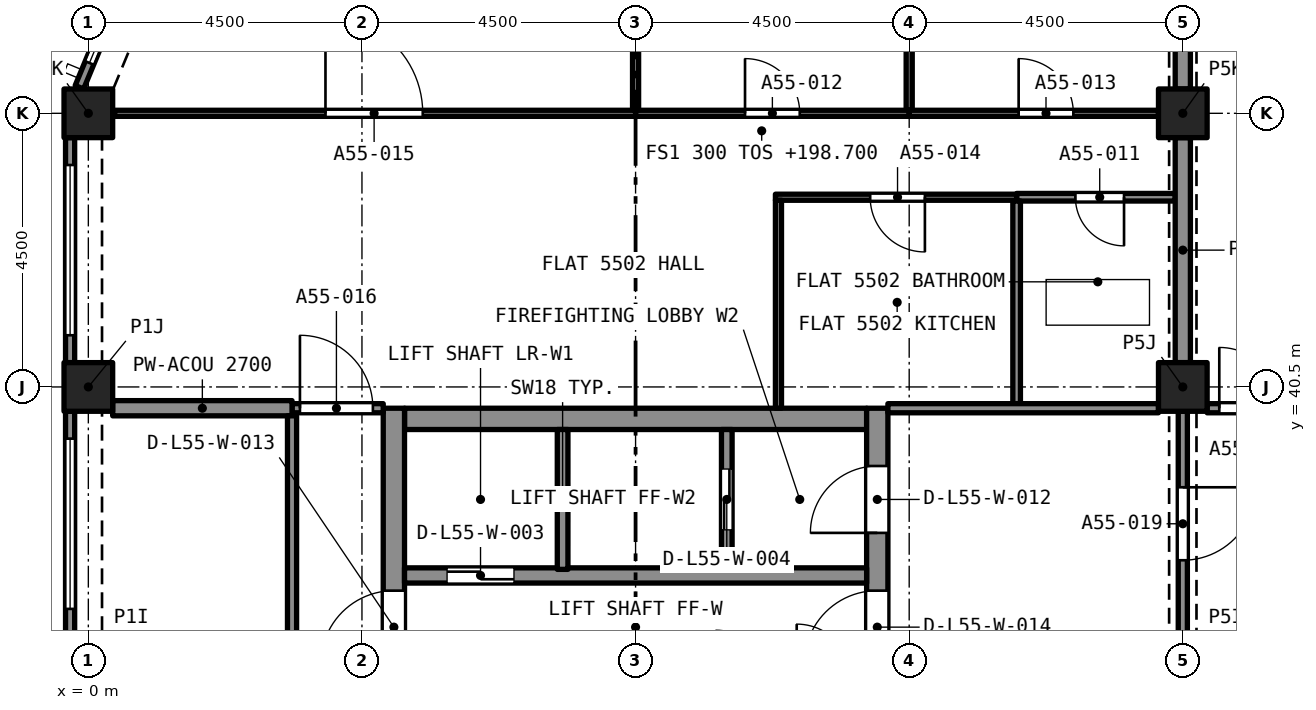
"""IFC4 building model, lengths in metres.
Left out: names, types, materials, properties, quantities, classifications, styles, units other than length and angle.
Written with IfcOpenShell. Run it as: python <this file> out.ifc"""

import sys

from ifc_helpers import new_model, si_unit, direction, frame, frame_2d, origin, origin_2d, place, context, subcontext, project, spatial, rectangle, extrude, element, fill, save


model = new_model("IFC4")
c1 = context("Model", 3, precision=1e-05, world=origin(), true_north=direction((0.0, 1.0)))
c2 = subcontext(c1, "Body", "Model", "MODEL_VIEW")
j1 = project(units=[si_unit("LENGTHUNIT", "METRE"), si_unit("PLANEANGLEUNIT", "RADIAN")], contexts=[c1])
p1 = place(None, origin())
s1 = spatial("IfcSite", under=j1, at=p1, CompositionType="ELEMENT")
p2 = place(p1, origin())
s2 = spatial("IfcBuilding", under=s1, at=p2, CompositionType="ELEMENT")
p3 = place(p2, frame((0.0, 0.0, 198.7)))
s3 = spatial("IfcBuildingStorey", under=s2, at=p3, CompositionType="ELEMENT", Elevation=198.7)
for number, where, z_axis, x_axis in (
    (1, (0.0, 40.5, 0.0), (0.0, 0.0, 1.0), (1.0, 0.0, 0.0)),
    (2, (18.0, 40.5, 0.0), (0.0, 0.0, 1.0), (1.0, 0.0, 0.0)),
    (3, (0.0, 45.0, 0.0), (0.0, 0.0, 1.0), (1.0, 0.0, 0.0)),
    (4, (18.0, 45.0, 0.0), (0.0, 0.0, 1.0), (1.0, 0.0, 0.0)),
):
    element("IfcColumn", number, at=place(p3, frame(where, z_axis=z_axis, x_axis=x_axis)), inside=s3, PredefinedType="COLUMN", context=c2, shape_type="SweptSolid", body=[
        extrude(rectangle(XDim=0.8, YDim=0.8, at=origin_2d()), origin(), (0.0, 0.0, 1.0), 3.2),
    ])
p4 = place(p3, frame((5.2, 39.975, 0.0), z_axis=(0.0, 0.0, 1.0), x_axis=(1.0, 0.0, 0.0)))
e5 = element("IfcWall", 5, at=p4, inside=s3, PredefinedType="SOLIDWALL", context=c2, shape_type="SweptSolid", body=[
    extrude(rectangle(XDim=7.6, YDim=0.35, at=frame_2d((3.8, 0.0))), origin(), (0.0, 0.0, 1.0), 3.2),
])
p5 = place(p3, frame((5.025, 27.35, 0.0), z_axis=(0.0, 0.0, 1.0), x_axis=(0.0, 1.0, 0.0)))
e6 = element("IfcWall", 6, at=p5, inside=s3, PredefinedType="SOLIDWALL", context=c2, shape_type="SweptSolid", body=[
    extrude(rectangle(XDim=12.8, YDim=0.35, at=frame_2d((6.4, 0.0))), origin(), (0.0, 0.0, 1.0), 3.2),
])
p6 = place(p5, frame((8.6, 0.0, 0.0)))
e7 = element("IfcOpeningElement", 7, at=p6, cuts=e6, PredefinedType="OPENING", context=c2, shape_type="SweptSolid", body=[
    extrude(rectangle(XDim=1.2, YDim=2.1, at=frame_2d((0.6, 1.05))), frame((0.0, 0.185, 0.0), z_axis=(0.0, -1.0, 0.0), x_axis=(1.0, 0.0, 0.0)), (0.0, 0.0, 1.0), 0.37),
])
p7 = place(p3, frame((12.975, 27.35, 0.0), z_axis=(0.0, 0.0, 1.0), x_axis=(0.0, 1.0, 0.0)))
e8 = element("IfcWall", 8, at=p7, inside=s3, PredefinedType="SOLIDWALL", context=c2, shape_type="SweptSolid", body=[
    extrude(rectangle(XDim=12.8, YDim=0.35, at=frame_2d((6.4, 0.0))), origin(), (0.0, 0.0, 1.0), 3.2),
])
p8 = place(p7, frame((10.75, 0.0, 0.0)))
e9 = element("IfcOpeningElement", 9, at=p8, cuts=e8, PredefinedType="OPENING", context=c2, shape_type="SweptSolid", body=[
    extrude(rectangle(XDim=1.1, YDim=2.1, at=frame_2d((0.55, 1.05))), frame((0.0, 0.185, 0.0), z_axis=(0.0, -1.0, 0.0), x_axis=(1.0, 0.0, 0.0)), (0.0, 0.0, 1.0), 0.37),
])
p9 = place(p7, frame((8.6, 0.0, 0.0)))
e10 = element("IfcOpeningElement", 10, at=p9, cuts=e8, PredefinedType="OPENING", context=c2, shape_type="SweptSolid", body=[
    extrude(rectangle(XDim=1.2, YDim=2.1, at=frame_2d((0.6, 1.05))), frame((0.0, 0.185, 0.0), z_axis=(0.0, -1.0, 0.0), x_axis=(1.0, 0.0, 0.0)), (0.0, 0.0, 1.0), 0.37),
])
p10 = place(p3, frame((-0.147, 45.429, 0.0), z_axis=(0.0, 0.0, 1.0), x_axis=(0.382669406082, 0.923885342263, 0.0)))
e11 = element("IfcWall", 11, at=p10, inside=s3, PredefinedType="SOLIDWALL", context=c2, shape_type="SweptSolid", body=[
    extrude(rectangle(XDim=2.602, YDim=0.15, at=frame_2d((1.301, 0.0))), origin(), (0.0, 0.0, 1.0), 3.2),
])
p11 = place(p10, frame((0.432, 0.0, 0.45)))
e12 = element("IfcOpeningElement", 12, at=p11, cuts=e11, PredefinedType="OPENING", context=c2, shape_type="SweptSolid", body=[
    extrude(rectangle(XDim=1.9, YDim=1.95, at=frame_2d((0.95, 0.975))), frame((0.0, 0.085, 0.0), z_axis=(0.0, -1.0, 0.0), x_axis=(1.0, 0.0, 0.0)), (0.0, 0.0, 1.0), 0.17),
])
p12 = place(p3, frame((-0.3, 40.9, 0.0), z_axis=(0.0, 0.0, 1.0), x_axis=(0.0, 1.0, 0.0)))
e13 = element("IfcWall", 13, at=p12, inside=s3, PredefinedType="SOLIDWALL", context=c2, shape_type="SweptSolid", body=[
    extrude(rectangle(XDim=3.7, YDim=0.15, at=frame_2d((1.85, 0.0))), origin(), (0.0, 0.0, 1.0), 3.2),
])
p13 = place(p12, frame((0.45, 0.0, 0.45)))
e14 = element("IfcOpeningElement", 14, at=p13, cuts=e13, PredefinedType="OPENING", context=c2, shape_type="SweptSolid", body=[
    extrude(rectangle(XDim=2.8, YDim=1.95, at=frame_2d((1.4, 0.975))), frame((0.0, 0.085, 0.0), z_axis=(0.0, -1.0, 0.0), x_axis=(1.0, 0.0, 0.0)), (0.0, 0.0, 1.0), 0.17),
])
p14 = place(p3, frame((-0.3, 36.4, 0.0), z_axis=(0.0, 0.0, 1.0), x_axis=(0.0, 1.0, 0.0)))
e15 = element("IfcWall", 15, at=p14, inside=s3, PredefinedType="SOLIDWALL", context=c2, shape_type="SweptSolid", body=[
    extrude(rectangle(XDim=3.7, YDim=0.15, at=frame_2d((1.85, 0.0))), origin(), (0.0, 0.0, 1.0), 3.2),
])
p15 = place(p14, frame((0.45, 0.0, 0.45)))
e16 = element("IfcOpeningElement", 16, at=p15, cuts=e15, PredefinedType="OPENING", context=c2, shape_type="SweptSolid", body=[
    extrude(rectangle(XDim=2.8, YDim=1.95, at=frame_2d((1.4, 0.975))), frame((0.0, 0.085, 0.0), z_axis=(0.0, -1.0, 0.0), x_axis=(1.0, 0.0, 0.0)), (0.0, 0.0, 1.0), 0.17),
])
p16 = place(p3, frame((17.875, 43.62, 0.0), z_axis=(0.0, 0.0, 1.0), x_axis=(-1.0, 0.0, 0.0)))
e17 = element("IfcWall", 17, at=p16, inside=s3, PredefinedType="PARTITIONING", context=c2, shape_type="SweptSolid", body=[
    extrude(rectangle(XDim=2.608, YDim=0.125, at=frame_2d((1.304, 0.0))), origin(), (0.0, 0.0, 1.0), 2.7),
])
p17 = place(p16, frame((0.842, 0.0, 0.0)))
e18 = element("IfcOpeningElement", 18, at=p17, cuts=e17, PredefinedType="OPENING", context=c2, shape_type="SweptSolid", body=[
    extrude(rectangle(XDim=0.8, YDim=2.1, at=frame_2d((0.4, 1.05))), frame((0.0, 0.073, 0.0), z_axis=(0.0, -1.0, 0.0), x_axis=(1.0, 0.0, 0.0)), (0.0, 0.0, 1.0), 0.145),
])
p18 = place(p3, frame((15.267, 40.225, 0.0), z_axis=(0.0, 0.0, 1.0), x_axis=(0.0, 1.0, 0.0)))
e19 = element("IfcWall", 19, at=p18, inside=s3, PredefinedType="PARTITIONING", context=c2, shape_type="SweptSolid", body=[
    extrude(rectangle(XDim=3.333, YDim=0.125, at=frame_2d((1.666, 0.0))), origin(), (0.0, 0.0, 1.0), 2.7),
])
p19 = place(p3, frame((18.0, 40.9, 0.0), z_axis=(0.0, 0.0, 1.0), x_axis=(0.0, 1.0, 0.0)))
e20 = element("IfcWall", 20, at=p19, inside=s3, PredefinedType="PARTITIONING", context=c2, shape_type="SweptSolid", body=[
    extrude(rectangle(XDim=3.7, YDim=0.25, at=frame_2d((1.85, 0.0))), origin(), (0.0, 0.0, 1.0), 2.38),
])
p20 = place(p3, frame((13.5, 45.05, 0.0), z_axis=(0.0, 0.0, 1.0), x_axis=(0.0, 1.0, 0.0)))
e21 = element("IfcWall", 21, at=p20, inside=s3, PredefinedType="PARTITIONING", context=c2, shape_type="SweptSolid", body=[
    extrude(rectangle(XDim=4.05, YDim=0.1, at=frame_2d((2.025, 0.0))), origin(), (0.0, 0.0, 1.0), 2.7),
])
p21 = place(p3, frame((9.0, 45.0, 0.0), z_axis=(0.0, 0.0, 1.0), x_axis=(1.0, 0.0, 0.0)))
e22 = element("IfcWall", 22, at=p21, inside=s3, PredefinedType="PARTITIONING", context=c2, shape_type="SweptSolid", body=[
    extrude(rectangle(XDim=4.5, YDim=0.1, at=frame_2d((2.25, 0.0))), origin(), (0.0, 0.0, 1.0), 2.7),
])
p22 = place(p21, frame((1.8, 0.0, 0.0)))
e23 = element("IfcOpeningElement", 23, at=p22, cuts=e22, PredefinedType="OPENING", context=c2, shape_type="SweptSolid", body=[
    extrude(rectangle(XDim=0.9, YDim=2.1, at=frame_2d((0.45, 1.05))), frame((0.0, 0.06, 0.0), z_axis=(0.0, -1.0, 0.0), x_axis=(1.0, 0.0, 0.0)), (0.0, 0.0, 1.0), 0.12),
])
p23 = place(p3, frame((9.0, 45.05, 0.0), z_axis=(0.0, 0.0, 1.0), x_axis=(0.0, 1.0, 0.0)))
e24 = element("IfcWall", 24, at=p23, inside=s3, PredefinedType="PARTITIONING", context=c2, shape_type="SweptSolid", body=[
    extrude(rectangle(XDim=4.05, YDim=0.1, at=frame_2d((2.025, 0.0))), origin(), (0.0, 0.0, 1.0), 2.7),
])
p24 = place(p3, frame((13.5, 45.0, 0.0), z_axis=(0.0, 0.0, 1.0), x_axis=(1.0, 0.0, 0.0)))
e25 = element("IfcWall", 25, at=p24, inside=s3, PredefinedType="PARTITIONING", context=c2, shape_type="SweptSolid", body=[
    extrude(rectangle(XDim=4.1, YDim=0.1, at=frame_2d((2.05, 0.0))), origin(), (0.0, 0.0, 1.0), 2.7),
])
p25 = place(p24, frame((1.8, 0.0, 0.0)))
e26 = element("IfcOpeningElement", 26, at=p25, cuts=e25, PredefinedType="OPENING", context=c2, shape_type="SweptSolid", body=[
    extrude(rectangle(XDim=0.9, YDim=2.1, at=frame_2d((0.45, 1.05))), frame((0.0, 0.06, 0.0), z_axis=(0.0, -1.0, 0.0), x_axis=(1.0, 0.0, 0.0)), (0.0, 0.0, 1.0), 0.12),
])
p26 = place(p3, frame((18.0, 45.4, 0.0), z_axis=(0.0, 0.0, 1.0), x_axis=(0.0, 1.0, 0.0)))
e27 = element("IfcWall", 27, at=p26, inside=s3, PredefinedType="PARTITIONING", context=c2, shape_type="SweptSolid", body=[
    extrude(rectangle(XDim=3.7, YDim=0.25, at=frame_2d((1.85, 0.0))), origin(), (0.0, 0.0, 1.0), 2.38),
])
p27 = place(p3, frame((15.267, 43.62, 0.0), z_axis=(0.0, 0.0, 1.0), x_axis=(-1.0, 0.0, 0.0)))
e28 = element("IfcWall", 28, at=p27, inside=s3, PredefinedType="PARTITIONING", context=c2, shape_type="SweptSolid", body=[
    extrude(rectangle(XDim=3.967, YDim=0.1, at=frame_2d((1.983, 0.0))), origin(), (0.0, 0.0, 1.0), 2.7),
])
p28 = place(p27, frame((1.508, 0.0, 0.0)))
e29 = element("IfcOpeningElement", 29, at=p28, cuts=e28, PredefinedType="OPENING", context=c2, shape_type="SweptSolid", body=[
    extrude(rectangle(XDim=0.9, YDim=2.1, at=frame_2d((0.45, 1.05))), frame((0.0, 0.06, 0.0), z_axis=(0.0, -1.0, 0.0), x_axis=(1.0, 0.0, 0.0)), (0.0, 0.0, 1.0), 0.12),
])
p29 = place(p3, frame((11.35, 40.15, 0.0), z_axis=(0.0, 0.0, 1.0), x_axis=(0.0, 1.0, 0.0)))
e30 = element("IfcWall", 30, at=p29, inside=s3, PredefinedType="PARTITIONING", context=c2, shape_type="SweptSolid", body=[
    extrude(rectangle(XDim=3.42, YDim=0.1, at=frame_2d((1.71, 0.0))), origin(), (0.0, 0.0, 1.0), 2.7),
])
p30 = place(p3, frame((0.433, 45.0, 0.0), z_axis=(0.0, 0.0, 1.0), x_axis=(1.0, 0.0, 0.0)))
e31 = element("IfcWall", 31, at=p30, inside=s3, PredefinedType="PARTITIONING", context=c2, shape_type="SweptSolid", body=[
    extrude(rectangle(XDim=8.567, YDim=0.1, at=frame_2d((4.284, 0.0))), origin(), (0.0, 0.0, 1.0), 2.7),
])
p31 = place(p30, frame((3.467, 0.0, 0.0)))
e32 = element("IfcOpeningElement", 32, at=p31, cuts=e31, PredefinedType="OPENING", context=c2, shape_type="SweptSolid", body=[
    extrude(rectangle(XDim=1.6, YDim=2.1, at=frame_2d((0.8, 1.05))), frame((0.0, 0.06, 0.0), z_axis=(0.0, -1.0, 0.0), x_axis=(1.0, 0.0, 0.0)), (0.0, 0.0, 1.0), 0.12),
])
p32 = place(p3, frame((3.35, 40.15, 0.0), z_axis=(0.0, 0.0, 1.0), x_axis=(1.0, 0.0, 0.0)))
e33 = element("IfcWall", 33, at=p32, inside=s3, PredefinedType="PARTITIONING", context=c2, shape_type="SweptSolid", body=[
    extrude(rectangle(XDim=1.5, YDim=0.15, at=frame_2d((0.75, 0.0))), origin(), (0.0, 0.0, 1.0), 2.7),
])
p33 = place(p32, frame((0.13, 0.0, 0.0)))
e34 = element("IfcOpeningElement", 34, at=p33, cuts=e33, PredefinedType="OPENING", context=c2, shape_type="SweptSolid", body=[
    extrude(rectangle(XDim=1.2, YDim=2.4, at=frame_2d((0.6, 1.2))), frame((0.0, 0.085, 0.0), z_axis=(0.0, -1.0, 0.0), x_axis=(1.0, 0.0, 0.0)), (0.0, 0.0, 1.0), 0.17),
])
p34 = place(p3, frame((0.4, 40.15, 0.0), z_axis=(0.0, 0.0, 1.0), x_axis=(1.0, 0.0, 0.0)))
e35 = element("IfcWall", 35, at=p34, inside=s3, PredefinedType="PARTITIONING", context=c2, shape_type="SweptSolid", body=[
    extrude(rectangle(XDim=2.95, YDim=0.25, at=frame_2d((1.475, 0.0))), origin(), (0.0, 0.0, 1.0), 2.7),
])
p35 = place(p3, frame((13.15, 40.15, 0.0), z_axis=(0.0, 0.0, 1.0), x_axis=(1.0, 0.0, 0.0)))
e36 = element("IfcWall", 36, at=p35, inside=s3, PredefinedType="PARTITIONING", context=c2, shape_type="SweptSolid", body=[
    extrude(rectangle(XDim=4.45, YDim=0.15, at=frame_2d((2.225, 0.0))), origin(), (0.0, 0.0, 1.0), 2.7),
])
p36 = place(p3, frame((18.4, 40.15, 0.0), z_axis=(0.0, 0.0, 1.0), x_axis=(1.0, 0.0, 0.0)))
e37 = element("IfcWall", 37, at=p36, inside=s3, PredefinedType="PARTITIONING", context=c2, shape_type="SweptSolid", body=[
    extrude(rectangle(XDim=2.2, YDim=0.15, at=frame_2d((1.1, 0.0))), origin(), (0.0, 0.0, 1.0), 2.7),
])
p37 = place(p36, frame((0.2, 0.0, 0.0)))
e38 = element("IfcOpeningElement", 38, at=p37, cuts=e37, PredefinedType="OPENING", context=c2, shape_type="SweptSolid", body=[
    extrude(rectangle(XDim=1.0, YDim=2.1, at=frame_2d((0.5, 1.05))), frame((0.0, 0.085, 0.0), z_axis=(0.0, -1.0, 0.0), x_axis=(1.0, 0.0, 0.0)), (0.0, 0.0, 1.0), 0.17),
])
p38 = place(p3, frame((18.0, 40.1, 0.0), z_axis=(0.0, 0.0, 1.0), x_axis=(0.0, -1.0, 0.0)))
e39 = element("IfcWall", 39, at=p38, inside=s3, PredefinedType="PARTITIONING", context=c2, shape_type="SweptSolid", body=[
    extrude(rectangle(XDim=3.7, YDim=0.15, at=frame_2d((1.85, 0.0))), origin(), (0.0, 0.0, 1.0), 2.38),
])
p39 = place(p38, frame((1.25, 0.0, 0.0)))
e40 = element("IfcOpeningElement", 40, at=p39, cuts=e39, PredefinedType="OPENING", context=c2, shape_type="SweptSolid", body=[
    extrude(rectangle(XDim=1.2, YDim=2.1, at=frame_2d((0.6, 1.05))), frame((0.0, 0.085, 0.0), z_axis=(0.0, -1.0, 0.0), x_axis=(1.0, 0.0, 0.0)), (0.0, 0.0, 1.0), 0.17),
])
p40 = place(p3, frame((3.35, 27.35, 0.0), z_axis=(0.0, 0.0, 1.0), x_axis=(0.0, 1.0, 0.0)))
e41 = element("IfcWall", 41, at=p40, inside=s3, PredefinedType="PARTITIONING", context=c2, shape_type="SweptSolid", body=[
    extrude(rectangle(XDim=12.675, YDim=0.15, at=frame_2d((6.337, 0.0))), origin(), (0.0, 0.0, 1.0), 2.7),
])
p41 = place(p40, frame((5.9, 0.0, 0.0)))
e42 = element("IfcOpeningElement", 42, at=p41, cuts=e41, PredefinedType="OPENING", context=c2, shape_type="SweptSolid", body=[
    extrude(rectangle(XDim=1.0, YDim=2.1, at=frame_2d((0.5, 1.05))), frame((0.0, 0.085, 0.0), z_axis=(0.0, -1.0, 0.0), x_axis=(1.0, 0.0, 0.0)), (0.0, 0.0, 1.0), 0.17),
])
p42 = place(p3, frame((5.2, 37.4, 0.0), z_axis=(0.0, 0.0, 1.0), x_axis=(1.0, 0.0, 0.0)))
e43 = element("IfcWall", 43, at=p42, inside=s3, PredefinedType="SOLIDWALL", context=c2, shape_type="SweptSolid", body=[
    extrude(rectangle(XDim=7.6, YDim=0.25, at=frame_2d((3.8, 0.0))), origin(), (0.0, 0.0, 1.0), 2.7),
])
p43 = place(p42, frame((0.7, 0.0, 0.0)))
e44 = element("IfcOpeningElement", 44, at=p43, cuts=e43, PredefinedType="OPENING", context=c2, shape_type="SweptSolid", body=[
    extrude(rectangle(XDim=1.1, YDim=2.4, at=frame_2d((0.55, 1.2))), frame((0.0, 0.135, 0.0), z_axis=(0.0, -1.0, 0.0), x_axis=(1.0, 0.0, 0.0)), (0.0, 0.0, 1.0), 0.27),
])
p44 = place(p3, frame((7.8, 37.5, 0.0), z_axis=(0.0, 0.0, 1.0), x_axis=(0.0, 1.0, 0.0)))
e45 = element("IfcWall", 45, at=p44, inside=s3, PredefinedType="SOLIDWALL", context=c2, shape_type="SweptSolid", body=[
    extrude(rectangle(XDim=2.3, YDim=0.175, at=frame_2d((1.15, 0.0))), origin(), (0.0, 0.0, 1.0), 2.7),
])
p45 = place(p3, frame((10.5, 37.5, 0.0), z_axis=(0.0, 0.0, 1.0), x_axis=(0.0, 1.0, 0.0)))
e46 = element("IfcWall", 46, at=p45, inside=s3, PredefinedType="SOLIDWALL", context=c2, shape_type="SweptSolid", body=[
    extrude(rectangle(XDim=2.3, YDim=0.175, at=frame_2d((1.15, 0.0))), origin(), (0.0, 0.0, 1.0), 2.7),
])
p46 = place(p45, frame((0.65, 0.0, 0.0)))
e47 = element("IfcOpeningElement", 47, at=p46, cuts=e46, PredefinedType="OPENING", context=c2, shape_type="SweptSolid", body=[
    extrude(rectangle(XDim=1.0, YDim=2.1, at=frame_2d((0.5, 1.05))), frame((0.0, 0.097, 0.0), z_axis=(0.0, -1.0, 0.0), x_axis=(1.0, 0.0, 0.0)), (0.0, 0.0, 1.0), 0.195),
])
p47 = place(p11, origin())
e48 = element("IfcWindow", 48, at=p47, inside=s3, PartitioningType="SINGLE_PANEL", PredefinedType="WINDOW", context=c2, shape_type="SweptSolid", body=[
    extrude(rectangle(XDim=1.9, YDim=1.95, at=frame_2d((0.95, 0.975))), frame((0.0, 0.03, 0.0), z_axis=(0.0, -1.0, 0.0), x_axis=(1.0, 0.0, 0.0)), (0.0, 0.0, 1.0), 0.06),
])
fill(e12, e48)
p48 = place(p13, origin())
e49 = element("IfcWindow", 49, at=p48, inside=s3, PartitioningType="SINGLE_PANEL", PredefinedType="WINDOW", context=c2, shape_type="SweptSolid", body=[
    extrude(rectangle(XDim=2.8, YDim=1.95, at=frame_2d((1.4, 0.975))), frame((0.0, 0.03, 0.0), z_axis=(0.0, -1.0, 0.0), x_axis=(1.0, 0.0, 0.0)), (0.0, 0.0, 1.0), 0.06),
])
fill(e14, e49)
p49 = place(p15, origin())
e50 = element("IfcWindow", 50, at=p49, inside=s3, PartitioningType="SINGLE_PANEL", PredefinedType="WINDOW", context=c2, shape_type="SweptSolid", body=[
    extrude(rectangle(XDim=2.8, YDim=1.95, at=frame_2d((1.4, 0.975))), frame((0.0, 0.03, 0.0), z_axis=(0.0, -1.0, 0.0), x_axis=(1.0, 0.0, 0.0)), (0.0, 0.0, 1.0), 0.06),
])
fill(e16, e50)
p50 = place(p17, origin())
e51 = element("IfcDoor", 51, at=p50, inside=s3, OperationType="SINGLE_SWING_LEFT", PredefinedType="DOOR", context=c2, shape_type="SweptSolid", body=[
    extrude(rectangle(XDim=0.8, YDim=2.1, at=frame_2d((0.4, 1.05))), frame((0.0, 0.025, 0.0), z_axis=(0.0, -1.0, 0.0), x_axis=(1.0, 0.0, 0.0)), (0.0, 0.0, 1.0), 0.05),
])
fill(e18, e51)
p51 = place(p22, origin())
e52 = element("IfcDoor", 52, at=p51, inside=s3, OperationType="SINGLE_SWING_LEFT", PredefinedType="DOOR", context=c2, shape_type="SweptSolid", body=[
    extrude(rectangle(XDim=0.9, YDim=2.1, at=frame_2d((0.45, 1.05))), frame((0.0, 0.025, 0.0), z_axis=(0.0, -1.0, 0.0), x_axis=(1.0, 0.0, 0.0)), (0.0, 0.0, 1.0), 0.05),
])
fill(e23, e52)
p52 = place(p25, origin())
e53 = element("IfcDoor", 53, at=p52, inside=s3, OperationType="SINGLE_SWING_RIGHT", PredefinedType="DOOR", context=c2, shape_type="SweptSolid", body=[
    extrude(rectangle(XDim=0.9, YDim=2.1, at=frame_2d((0.45, 1.05))), frame((0.0, 0.025, 0.0), z_axis=(0.0, -1.0, 0.0), x_axis=(1.0, 0.0, 0.0)), (0.0, 0.0, 1.0), 0.05),
])
fill(e26, e53)
p53 = place(p28, origin())
e54 = element("IfcDoor", 54, at=p53, inside=s3, OperationType="SINGLE_SWING_LEFT", PredefinedType="DOOR", context=c2, shape_type="SweptSolid", body=[
    extrude(rectangle(XDim=0.9, YDim=2.1, at=frame_2d((0.45, 1.05))), frame((0.0, 0.025, 0.0), z_axis=(0.0, -1.0, 0.0), x_axis=(1.0, 0.0, 0.0)), (0.0, 0.0, 1.0), 0.05),
])
fill(e29, e54)
p54 = place(p31, origin())
e55 = element("IfcDoor", 55, at=p54, inside=s3, OperationType="SINGLE_SWING_LEFT", PredefinedType="DOOR", context=c2, shape_type="SweptSolid", body=[
    extrude(rectangle(XDim=1.6, YDim=2.1, at=frame_2d((0.8, 1.05))), frame((0.0, 0.025, 0.0), z_axis=(0.0, -1.0, 0.0), x_axis=(1.0, 0.0, 0.0)), (0.0, 0.0, 1.0), 0.05),
])
fill(e32, e55)
p55 = place(p33, origin())
e56 = element("IfcDoor", 56, at=p55, inside=s3, OperationType="SINGLE_SWING_LEFT", PredefinedType="DOOR", context=c2, shape_type="SweptSolid", body=[
    extrude(rectangle(XDim=1.2, YDim=2.4, at=frame_2d((0.6, 1.2))), frame((0.0, 0.025, 0.0), z_axis=(0.0, -1.0, 0.0), x_axis=(1.0, 0.0, 0.0)), (0.0, 0.0, 1.0), 0.05),
])
fill(e34, e56)
p56 = place(p37, origin())
e57 = element("IfcDoor", 57, at=p56, inside=s3, OperationType="SINGLE_SWING_LEFT", PredefinedType="DOOR", context=c2, shape_type="SweptSolid", body=[
    extrude(rectangle(XDim=1.0, YDim=2.1, at=frame_2d((0.5, 1.05))), frame((0.0, 0.025, 0.0), z_axis=(0.0, -1.0, 0.0), x_axis=(1.0, 0.0, 0.0)), (0.0, 0.0, 1.0), 0.05),
])
fill(e38, e57)
p57 = place(p39, origin())
e58 = element("IfcDoor", 58, at=p57, inside=s3, OperationType="SINGLE_SWING_LEFT", PredefinedType="DOOR", context=c2, shape_type="SweptSolid", body=[
    extrude(rectangle(XDim=1.2, YDim=2.1, at=frame_2d((0.6, 1.05))), frame((0.0, 0.025, 0.0), z_axis=(0.0, -1.0, 0.0), x_axis=(1.0, 0.0, 0.0)), (0.0, 0.0, 1.0), 0.05),
])
fill(e40, e58)
p58 = place(p43, origin())
e59 = element("IfcDoor", 59, at=p58, inside=s3, OperationType="SLIDING_TO_LEFT", PredefinedType="DOOR", context=c2, shape_type="SweptSolid", body=[
    extrude(rectangle(XDim=1.1, YDim=2.4, at=frame_2d((0.55, 1.2))), frame((0.0, 0.025, 0.0), z_axis=(0.0, -1.0, 0.0), x_axis=(1.0, 0.0, 0.0)), (0.0, 0.0, 1.0), 0.05),
])
fill(e44, e59)
p59 = place(p46, origin())
e60 = element("IfcDoor", 60, at=p59, inside=s3, OperationType="SLIDING_TO_LEFT", PredefinedType="DOOR", context=c2, shape_type="SweptSolid", body=[
    extrude(rectangle(XDim=1.0, YDim=2.1, at=frame_2d((0.5, 1.05))), frame((0.0, 0.025, 0.0), z_axis=(0.0, -1.0, 0.0), x_axis=(1.0, 0.0, 0.0)), (0.0, 0.0, 1.0), 0.05),
])
fill(e47, e60)
p60 = place(p8, origin())
e61 = element("IfcDoor", 61, at=p60, inside=s3, OperationType="SINGLE_SWING_LEFT", PredefinedType="DOOR", context=c2, shape_type="SweptSolid", body=[
    extrude(rectangle(XDim=1.1, YDim=2.1, at=frame_2d((0.55, 1.05))), frame((0.0, 0.025, 0.0), z_axis=(0.0, -1.0, 0.0), x_axis=(1.0, 0.0, 0.0)), (0.0, 0.0, 1.0), 0.05),
])
fill(e9, e61)
p61 = place(p6, origin())
e62 = element("IfcDoor", 62, at=p61, inside=s3, OperationType="SINGLE_SWING_LEFT", PredefinedType="DOOR", context=c2, shape_type="SweptSolid", body=[
    extrude(rectangle(XDim=1.2, YDim=2.1, at=frame_2d((0.6, 1.05))), frame((0.0, 0.025, 0.0), z_axis=(0.0, -1.0, 0.0), x_axis=(1.0, 0.0, 0.0)), (0.0, 0.0, 1.0), 0.05),
])
fill(e7, e62)
p62 = place(p9, origin())
e63 = element("IfcDoor", 63, at=p62, inside=s3, OperationType="SINGLE_SWING_LEFT", PredefinedType="DOOR", context=c2, shape_type="SweptSolid", body=[
    extrude(rectangle(XDim=1.2, YDim=2.1, at=frame_2d((0.6, 1.05))), frame((0.0, 0.025, 0.0), z_axis=(0.0, -1.0, 0.0), x_axis=(1.0, 0.0, 0.0)), (0.0, 0.0, 1.0), 0.05),
])
fill(e10, e63)
save(model, sys.argv[1])
